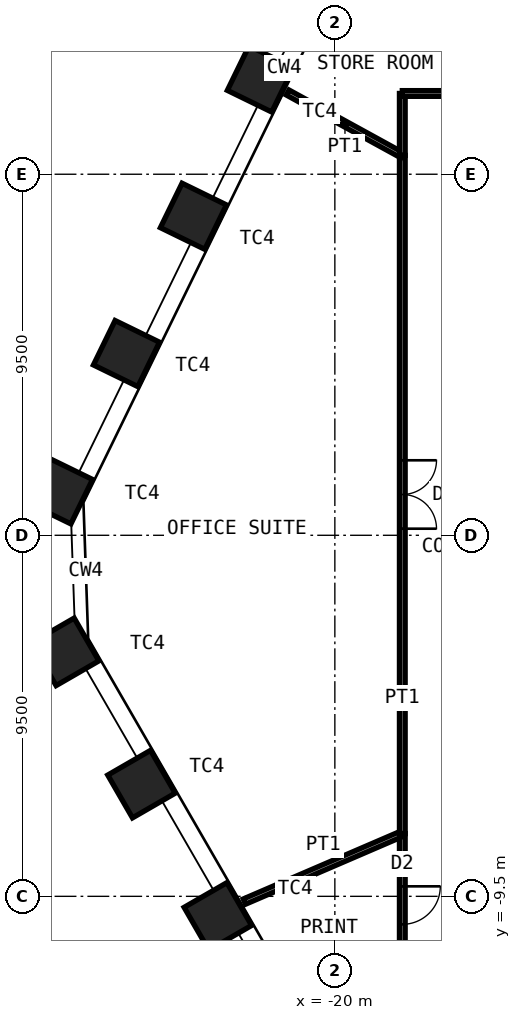
"""IFC4 building model, lengths in metres.
Left out: names, types, materials, properties, quantities, classifications, styles, units other than length and angle.
Written with IfcOpenShell. Run it as: python <this file> out.ifc"""

import sys

from ifc_helpers import new_model, si_unit, direction, frame, frame_2d, origin, origin_2d, place, context, subcontext, project, spatial, rectangle, hollow_rectangle, extrude, element, fill, save


model = new_model("IFC4")
c1 = context("Model", 3, precision=1e-05, world=origin(), true_north=direction((0.0, 1.0)))
c2 = subcontext(c1, "Body", "Model", "MODEL_VIEW")
j1 = project(units=[si_unit("LENGTHUNIT", "METRE"), si_unit("PLANEANGLEUNIT", "RADIAN")], contexts=[c1])
p1 = place(None, origin())
s1 = spatial("IfcSite", under=j1, at=p1, CompositionType="ELEMENT")
p2 = place(p1, origin())
s2 = spatial("IfcBuilding", under=s1, at=p2, CompositionType="ELEMENT")
p3 = place(p2, frame((0.0, 0.0, 166.0)))
s3 = spatial("IfcBuildingStorey", under=s2, at=p3, CompositionType="ELEMENT", Elevation=166.0)
for number, where, z_axis, x_axis in (
    (1, (-23.078, -10.028, 0.0), (0.0, 0.0, 1.0), (0.5, -0.866, 0.0)),
    (2, (-25.087, -6.547, 0.0), (0.0, 0.0, 1.0), (0.5, -0.866, 0.0)),
    (3, (-27.097, -3.067, 0.0), (0.0, 0.0, 1.0), (0.5, -0.866, 0.0)),
    (4, (-27.245, 1.169, 0.0), (0.0, 0.0, 1.0), (-0.438, -0.899, 0.0)),
    (5, (-25.483, 4.781, 0.0), (0.0, 0.0, 1.0), (-0.438, -0.899, 0.0)),
    (6, (-23.721, 8.394, 0.0), (0.0, 0.0, 1.0), (-0.438, -0.899, 0.0)),
    (7, (-21.959, 12.006, 0.0), (0.0, 0.0, 1.0), (-0.438, -0.899, 0.0)),
):
    element("IfcColumn", number, at=place(p3, frame(where, z_axis=z_axis, x_axis=x_axis)), inside=s3, PredefinedType="COLUMN", context=c2, shape_type="SweptSolid", body=[
        extrude(hollow_rectangle(XDim=1.3, YDim=1.3, WallThickness=0.1, at=origin_2d()), origin(), (0.0, 0.0, 1.0), 4.2),
    ])
p4 = place(p3, frame((-18.225, -11.625, 0.0), z_axis=(0.0, 0.0, 1.0), x_axis=(0.0, 1.0, 0.0)))
e8 = element("IfcWall", 8, at=p4, inside=s3, PredefinedType="PARTITIONING", context=c2, shape_type="SweptSolid", body=[
    extrude(rectangle(XDim=3.776, YDim=0.15, at=frame_2d((1.888, 0.0))), origin(), (0.0, 0.0, 1.0), 4.03),
])
p5 = place(p4, frame((1.388, 0.0, 0.0)))
e9 = element("IfcOpeningElement", 9, at=p5, cuts=e8, PredefinedType="OPENING", context=c2, shape_type="SweptSolid", body=[
    extrude(rectangle(XDim=1.0, YDim=2.4, at=frame_2d((0.5, 1.2))), frame((0.0, 0.085, 0.0), z_axis=(0.0, -1.0, 0.0), x_axis=(1.0, 0.0, 0.0)), (0.0, 0.0, 1.0), 0.17),
])
p6 = place(p3, frame((-22.38, -9.638, 0.0), z_axis=(0.0, 0.0, 1.0), x_axis=(0.918428905659, 0.395586078181, 0.0)))
e10 = element("IfcWall", 10, at=p6, inside=s3, PredefinedType="PARTITIONING", context=c2, shape_type="SweptSolid", body=[
    extrude(rectangle(XDim=4.524, YDim=0.15, at=frame_2d((2.262, 0.0))), origin(), (0.0, 0.0, 1.0), 2.93),
])
p7 = place(p3, frame((-18.225, -7.849, 0.0), z_axis=(0.0, 0.0, 1.0), x_axis=(0.0, 1.0, 0.0)))
e11 = element("IfcWall", 11, at=p7, inside=s3, PredefinedType="PARTITIONING", context=c2, shape_type="SweptSolid", body=[
    extrude(rectangle(XDim=17.845, YDim=0.15, at=frame_2d((8.922, 0.0))), origin(), (0.0, 0.0, 1.0), 4.03),
])
p8 = place(p7, frame((8.022, 0.0, 0.0)))
e12 = element("IfcOpeningElement", 12, at=p8, cuts=e11, PredefinedType="OPENING", context=c2, shape_type="SweptSolid", body=[
    extrude(rectangle(XDim=1.8, YDim=2.4, at=frame_2d((0.9, 1.2))), frame((0.0, 0.085, 0.0), z_axis=(0.0, -1.0, 0.0), x_axis=(1.0, 0.0, 0.0)), (0.0, 0.0, 1.0), 0.17),
])
p9 = place(p3, frame((-21.242, 11.651, 0.0), z_axis=(0.0, 0.0, 1.0), x_axis=(0.876768023831, -0.480913539409, 0.0)))
e13 = element("IfcWall", 13, at=p9, inside=s3, PredefinedType="PARTITIONING", context=c2, shape_type="SweptSolid", body=[
    extrude(rectangle(XDim=3.441, YDim=0.15, at=frame_2d((1.721, 0.0))), origin(), (0.0, 0.0, 1.0), 2.93),
])
p10 = place(p3, frame((-18.225, 9.996, 0.0), z_axis=(0.0, 0.0, 1.0), x_axis=(0.0, 1.0, 0.0)))
e14 = element("IfcWall", 14, at=p10, inside=s3, PredefinedType="PARTITIONING", context=c2, shape_type="SweptSolid", body=[
    extrude(rectangle(XDim=1.629, YDim=0.15, at=frame_2d((0.814, 0.0))), origin(), (0.0, 0.0, 1.0), 4.03),
])
p11 = place(p3, frame((-18.225, 11.625, 0.0), z_axis=(0.0, 0.0, 1.0), x_axis=(1.0, 0.0, 0.0)))
e15 = element("IfcWall", 15, at=p11, inside=s3, PredefinedType="PARTITIONING", context=c2, shape_type="SweptSolid", body=[
    extrude(rectangle(XDim=3.368, YDim=0.15, at=frame_2d((1.684, 0.0))), origin(), (0.0, 0.0, 1.0), 4.03),
])
p12 = place(p11, frame((1.184, 0.0, 0.0)))
e16 = element("IfcOpeningElement", 16, at=p12, cuts=e15, PredefinedType="OPENING", context=c2, shape_type="SweptSolid", body=[
    extrude(rectangle(XDim=1.0, YDim=2.4, at=frame_2d((0.5, 1.2))), frame((0.0, 0.085, 0.0), z_axis=(0.0, -1.0, 0.0), x_axis=(1.0, 0.0, 0.0)), (0.0, 0.0, 1.0), 0.17),
])
p13 = place(p3, frame((-19.49, 15.25, 0.0), z_axis=(0.0, 0.0, 1.0), x_axis=(0.787549668605, -0.616251182133, 0.0)))
e17 = element("IfcWall", 17, at=p13, inside=s3, PredefinedType="PARTITIONING", context=c2, shape_type="SweptSolid", body=[
    extrude(rectangle(XDim=5.882, YDim=0.15, at=frame_2d((2.941, 0.0))), origin(), (0.0, 0.0, 1.0), 2.93),
])
p14 = place(p5, origin())
e18 = element("IfcDoor", 18, at=p14, inside=s3, OperationType="SINGLE_SWING_RIGHT", PredefinedType="DOOR", context=c2, shape_type="SweptSolid", body=[
    extrude(rectangle(XDim=1.0, YDim=2.4, at=frame_2d((0.5, 1.2))), frame((0.0, 0.025, 0.0), z_axis=(0.0, -1.0, 0.0), x_axis=(1.0, 0.0, 0.0)), (0.0, 0.0, 1.0), 0.05),
])
fill(e9, e18)
p15 = place(p8, origin())
e19 = element("IfcDoor", 19, at=p15, inside=s3, OperationType="DOUBLE_DOOR_DOUBLE_SWING", PredefinedType="DOOR", context=c2, shape_type="SweptSolid", body=[
    extrude(rectangle(XDim=1.8, YDim=2.4, at=frame_2d((0.9, 1.2))), frame((0.0, 0.025, 0.0), z_axis=(0.0, -1.0, 0.0), x_axis=(1.0, 0.0, 0.0)), (0.0, 0.0, 1.0), 0.05),
])
fill(e12, e19)
save(model, sys.argv[1])
